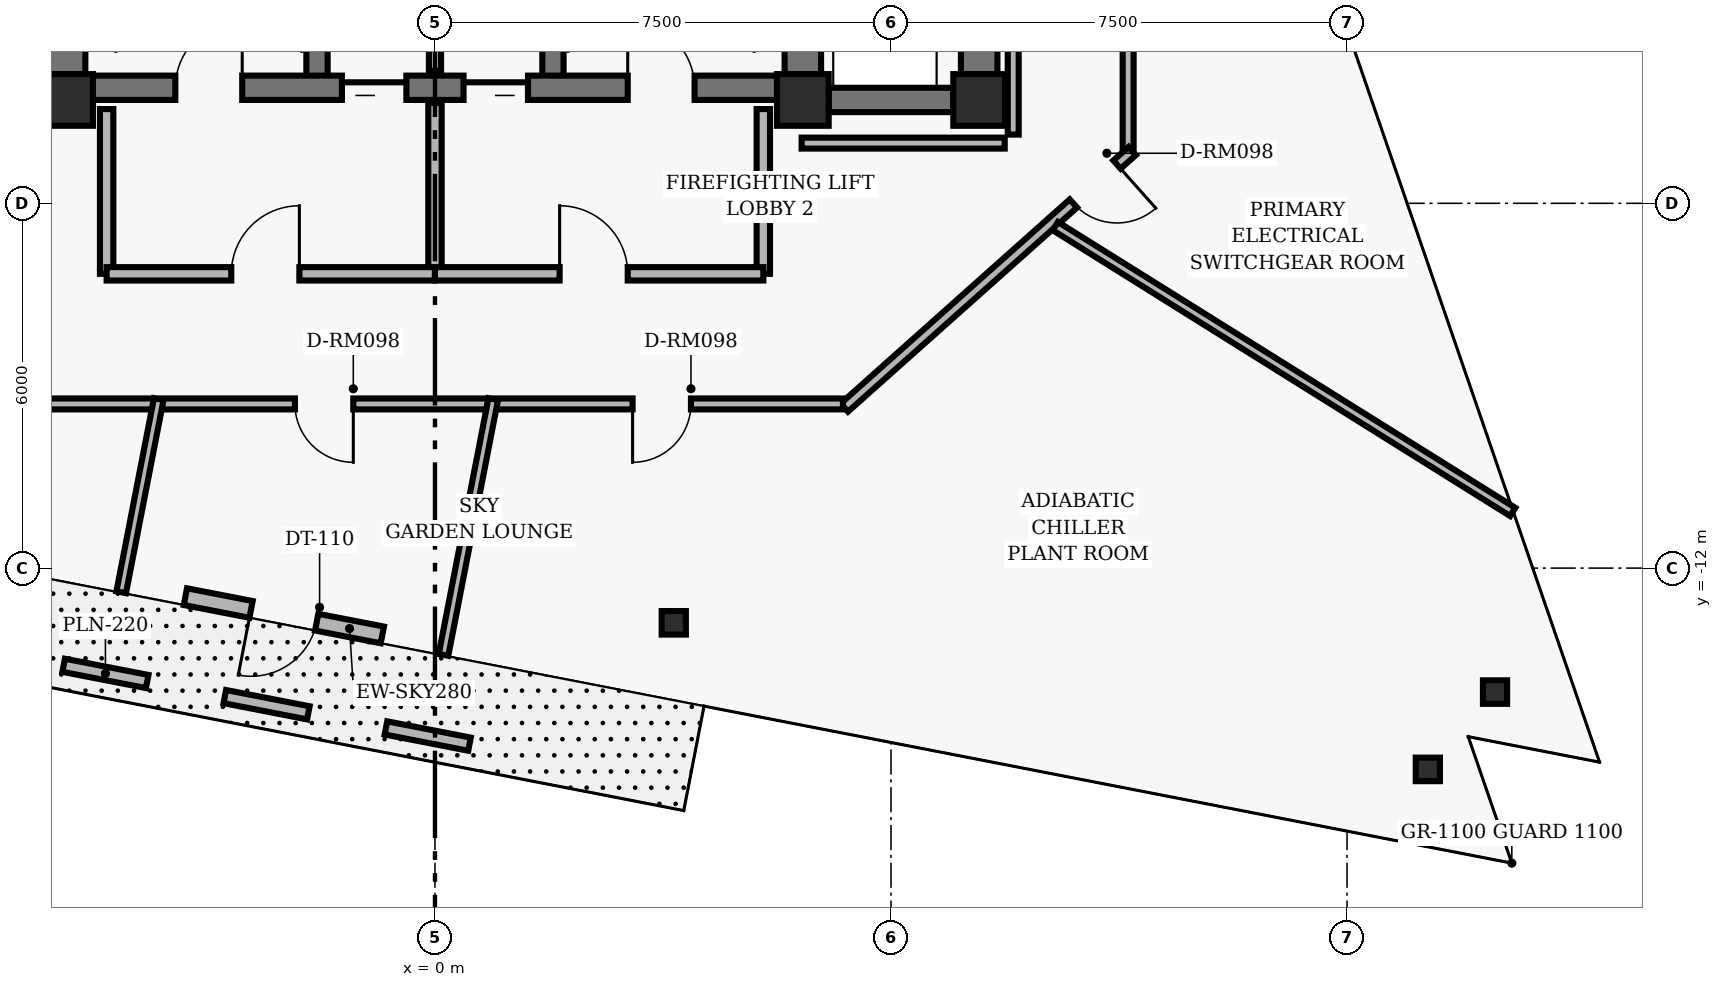
"""IFC4 building model, lengths in metres.
Left out: names, types, materials, properties, quantities, classifications, styles, units other than length and angle.
Written with IfcOpenShell. Run it as: python <this file> out.ifc"""

import sys

from ifc_helpers import new_model, si_unit, direction, frame, frame_2d, origin, origin_2d, place, context, subcontext, project, spatial, rectangle, hollow_rectangle, i_section, extrude, element, fill, save


model = new_model("IFC4")
c1 = context("Model", 3, precision=1e-05, world=origin(), true_north=direction((0.0, 1.0)))
c2 = subcontext(c1, "Body", "Model", "MODEL_VIEW")
j1 = project(units=[si_unit("LENGTHUNIT", "METRE"), si_unit("PLANEANGLEUNIT", "RADIAN")], contexts=[c1])
p1 = place(None, origin())
s1 = spatial("IfcSite", under=j1, at=p1, CompositionType="ELEMENT")
p2 = place(p1, origin())
s2 = spatial("IfcBuilding", under=s1, at=p2, CompositionType="ELEMENT")
p3 = place(p2, frame((0.0, 0.0, 171.52)))
s3 = spatial("IfcBuildingStorey", under=s2, at=p3, CompositionType="ELEMENT", Elevation=171.52)
for number, where, z_axis, x_axis in (
    (1, (-6.05, -4.3, 0.0), (0.0, 0.0, 1.0), (1.0, 0.0, 0.0)),
    (2, (6.05, -4.3, 0.0), (0.0, 0.0, 1.0), (1.0, 0.0, 0.0)),
    (3, (8.95, -4.3, 0.0), (0.0, 0.0, 1.0), (1.0, 0.0, 0.0)),
):
    element("IfcColumn", number, at=place(p3, frame(where, z_axis=z_axis, x_axis=x_axis)), inside=s3, PredefinedType="COLUMN", context=c2, shape_type="SweptSolid", body=[
        extrude(hollow_rectangle(XDim=0.85, YDim=0.85, WallThickness=0.055, InnerFilletRadius=0.02, OuterFilletRadius=0.04, at=origin_2d()), origin(), (0.0, 0.0, 1.0), 3.84),
    ])
for number, where, z_axis, x_axis in (
    (4, (-6.05, -3.875, 0.0), (0.0, 0.0, 1.0), (0.0, 1.0, 0.0)),
    (5, (6.05, -3.875, 0.0), (0.0, 0.0, 1.0), (0.0, 1.0, 0.0)),
):
    element("IfcWall", number, at=place(p3, frame(where, z_axis=z_axis, x_axis=x_axis)), inside=s3, PredefinedType="SHEAR", context=c2, shape_type="SweptSolid", body=[
        extrude(rectangle(XDim=3.45, YDim=0.6, at=frame_2d((1.725, 0.0))), origin(), (0.0, 0.0, 1.0), 3.418),
    ])
for number, where, z_axis, x_axis in (
    (6, (-1.94, -4.1, 0.0), (0.0, 0.0, 1.0), (0.0, 1.0, 0.0)),
    (7, (1.94, -4.1, 0.0), (0.0, 0.0, 1.0), (0.0, 1.0, 0.0)),
):
    element("IfcWall", number, at=place(p3, frame(where, z_axis=z_axis, x_axis=x_axis)), inside=s3, PredefinedType="SHEAR", context=c2, shape_type="SweptSolid", body=[
        extrude(rectangle(XDim=8.2, YDim=0.35, at=frame_2d((4.1, 0.0))), origin(), (0.0, 0.0, 1.0), 3.418),
    ])
p4 = place(p3, frame((-5.625, -4.1, 0.0), z_axis=(0.0, 0.0, 1.0), x_axis=(1.0, 0.0, 0.0)))
e8 = element("IfcWall", 8, at=p4, inside=s3, PredefinedType="SHEAR", context=c2, shape_type="SweptSolid", body=[
    extrude(rectangle(XDim=11.25, YDim=0.4, at=frame_2d((5.625, 0.0))), origin(), (0.0, 0.0, 1.0), 3.418),
])
p5 = place(p4, frame((1.355, 0.0, 0.0)))
e9 = element("IfcOpeningElement", 9, at=p5, cuts=e8, PredefinedType="OPENING", context=c2, shape_type="SweptSolid", body=[
    extrude(rectangle(XDim=1.1, YDim=2.04, at=frame_2d((0.55, 1.02))), frame((0.0, 0.21, 0.0), z_axis=(0.0, -1.0, 0.0), x_axis=(1.0, 0.0, 0.0)), (0.0, 0.0, 1.0), 0.42),
])
p6 = place(p4, frame((8.795, 0.0, 0.0)))
e10 = element("IfcOpeningElement", 10, at=p6, cuts=e8, PredefinedType="OPENING", context=c2, shape_type="SweptSolid", body=[
    extrude(rectangle(XDim=1.1, YDim=2.04, at=frame_2d((0.55, 1.02))), frame((0.0, 0.21, 0.0), z_axis=(0.0, -1.0, 0.0), x_axis=(1.0, 0.0, 0.0)), (0.0, 0.0, 1.0), 0.42),
])
p7 = place(p4, frame((4.095, 0.0, 0.0)))
e11 = element("IfcOpeningElement", 11, at=p7, cuts=e8, PredefinedType="OPENING", context=c2, shape_type="SweptSolid", body=[
    extrude(rectangle(XDim=1.06, YDim=2.04, at=frame_2d((0.53, 1.02))), frame((0.0, 0.21, 0.0), z_axis=(0.0, -1.0, 0.0), x_axis=(1.0, 0.0, 0.0)), (0.0, 0.0, 1.0), 0.42),
])
p8 = place(p4, frame((6.095, 0.0, 0.0)))
e12 = element("IfcOpeningElement", 12, at=p8, cuts=e8, PredefinedType="OPENING", context=c2, shape_type="SweptSolid", body=[
    extrude(rectangle(XDim=1.06, YDim=2.04, at=frame_2d((0.53, 1.02))), frame((0.0, 0.21, 0.0), z_axis=(0.0, -1.0, 0.0), x_axis=(1.0, 0.0, 0.0)), (0.0, 0.0, 1.0), 0.42),
])
p9 = place(p3, frame((8.95, -3.875, 0.0), z_axis=(0.0, 0.0, 1.0), x_axis=(0.0, 1.0, 0.0)))
e13 = element("IfcWall", 13, at=p9, inside=s3, PredefinedType="SHEAR", context=c2, shape_type="SweptSolid", body=[
    extrude(rectangle(XDim=7.95, YDim=0.6, at=frame_2d((3.975, 0.0))), origin(), (0.0, 0.0, 1.0), 3.418),
])
p10 = place(p3, frame((6.475, -4.3, 0.0), z_axis=(0.0, 0.0, 1.0), x_axis=(1.0, 0.0, 0.0)))
e14 = element("IfcWall", 14, at=p10, inside=s3, PredefinedType="SHEAR", context=c2, shape_type="SweptSolid", body=[
    extrude(rectangle(XDim=2.05, YDim=0.4, at=frame_2d((1.025, 0.0))), origin(), (0.0, 0.0, 1.0), 3.418),
])
for number, where, z_axis, x_axis in (
    (15, (17.434, -14.039, 0.0), (0.0, 0.0, 1.0), (1.0, 0.0, 0.0)),
    (16, (3.927, -12.9, 0.0), (0.0, 0.0, 1.0), (1.0, 0.0, 0.0)),
    (17, (16.329, -15.311, 0.0), (0.0, 0.0, 1.0), (1.0, 0.0, 0.0)),
):
    element("IfcColumn", number, at=place(p3, frame(where, z_axis=z_axis, x_axis=x_axis)), inside=s3, PredefinedType="COLUMN", context=c2, shape_type="SweptSolid", body=[
        extrude(i_section(OverallWidth=0.398, OverallDepth=0.387, WebThickness=0.021, FlangeThickness=0.033, FilletRadius=0.018, at=origin_2d()), origin(), (0.0, 0.0, 1.0), 3.84),
    ])
p11 = place(p3, frame((-6.107, -13.598, 0.0), z_axis=(0.0, 0.0, 1.0), x_axis=(0.981632630023, -0.190780973041, 0.0)))
e18 = element("IfcWall", 18, at=p11, inside=s3, PredefinedType="USERDEFINED", context=c2, shape_type="SweptSolid", body=[
    extrude(rectangle(XDim=1.4, YDim=0.22, at=frame_2d((0.7, 0.0))), origin(), (0.0, 0.0, 1.0), 0.65),
])
p12 = place(p3, frame((-3.457, -14.113, 0.0), z_axis=(0.0, 0.0, 1.0), x_axis=(0.98159995781, -0.190949005827, 0.0)))
e19 = element("IfcWall", 19, at=p12, inside=s3, PredefinedType="USERDEFINED", context=c2, shape_type="SweptSolid", body=[
    extrude(rectangle(XDim=1.4, YDim=0.22, at=frame_2d((0.7, 0.0))), origin(), (0.0, 0.0, 1.0), 0.65),
])
p13 = place(p3, frame((-0.806, -14.629, 0.0), z_axis=(0.0, 0.0, 1.0), x_axis=(0.981632630023, -0.190780973041, 0.0)))
e20 = element("IfcWall", 20, at=p13, inside=s3, PredefinedType="USERDEFINED", context=c2, shape_type="SweptSolid", body=[
    extrude(rectangle(XDim=1.4, YDim=0.22, at=frame_2d((0.7, 0.0))), origin(), (0.0, 0.0, 1.0), 0.65),
])
p14 = place(p3, frame((-0.865, -13.099, 0.0), z_axis=(0.0, 0.0, 1.0), x_axis=(-0.981627709222, 0.19080629048, 0.0)))
e21 = element("IfcWall", 21, at=p14, inside=s3, PredefinedType="SOLIDWALL", context=c2, shape_type="SweptSolid", body=[
    extrude(rectangle(XDim=3.3, YDim=0.28, at=frame_2d((1.65, 0.0))), origin(), (0.0, 0.0, 1.0), 2.348),
])
p15 = place(p14, frame((1.1, 0.0, 0.0)))
e22 = element("IfcOpeningElement", 22, at=p15, cuts=e21, PredefinedType="OPENING", context=c2, shape_type="SweptSolid", body=[
    extrude(rectangle(XDim=1.1, YDim=2.15, at=frame_2d((0.55, 1.075))), frame((0.0, 0.15, 0.0), z_axis=(0.0, -1.0, 0.0), x_axis=(1.0, 0.0, 0.0)), (0.0, 0.0, 1.0), 0.3),
])
p16 = place(p3, frame((0.0, -3.82, 0.0), z_axis=(0.0, 0.0, 1.0), x_axis=(0.0, 1.0, 0.0)))
e23 = element("IfcWall", 23, at=p16, inside=s3, PredefinedType="PARTITIONING", context=c2, shape_type="SweptSolid", body=[
    extrude(rectangle(XDim=2.67, YDim=0.2, at=frame_2d((1.335, 0.0))), origin(), (0.0, 0.0, 1.0), 3.393),
])
for number, where, z_axis, x_axis in (
    (24, (-5.4, -7.16, 0.0), (0.0, 0.0, 1.0), (0.0, 1.0, 0.0)),
    (25, (5.4, -7.16, 0.0), (0.0, 0.0, 1.0), (0.0, 1.0, 0.0)),
):
    element("IfcWall", number, at=place(p3, frame(where, z_axis=z_axis, x_axis=x_axis)), inside=s3, PredefinedType="PARTITIONING", context=c2, shape_type="SweptSolid", body=[
        extrude(rectangle(XDim=2.71, YDim=0.22, at=frame_2d((1.355, 0.0))), origin(), (0.0, 0.0, 1.0), 3.393),
    ])
p17 = place(p3, frame((0.0, -7.16, 0.0), z_axis=(0.0, 0.0, 1.0), x_axis=(0.0, 1.0, 0.0)))
e26 = element("IfcWall", 26, at=p17, inside=s3, PredefinedType="PARTITIONING", context=c2, shape_type="SweptSolid", body=[
    extrude(rectangle(XDim=2.81, YDim=0.22, at=frame_2d((1.405, 0.0))), origin(), (0.0, 0.0, 1.0), 3.393),
])
p18 = place(p3, frame((-5.4, -7.16, 0.0), z_axis=(0.0, 0.0, 1.0), x_axis=(1.0, 0.0, 0.0)))
e27 = element("IfcWall", 27, at=p18, inside=s3, PredefinedType="PARTITIONING", context=c2, shape_type="SweptSolid", body=[
    extrude(rectangle(XDim=5.4, YDim=0.22, at=frame_2d((2.7, 0.0))), origin(), (0.0, 0.0, 1.0), 3.393),
])
p19 = place(p18, frame((2.05, 0.0, 0.0)))
e28 = element("IfcOpeningElement", 28, at=p19, cuts=e27, PredefinedType="OPENING", context=c2, shape_type="SweptSolid", body=[
    extrude(rectangle(XDim=1.12, YDim=2.02, at=frame_2d((0.56, 1.01))), frame((0.0, 0.12, 0.0), z_axis=(0.0, -1.0, 0.0), x_axis=(1.0, 0.0, 0.0)), (0.0, 0.0, 1.0), 0.24),
])
p20 = place(p3, frame((0.0, -7.16, 0.0), z_axis=(0.0, 0.0, 1.0), x_axis=(1.0, 0.0, 0.0)))
e29 = element("IfcWall", 29, at=p20, inside=s3, PredefinedType="PARTITIONING", context=c2, shape_type="SweptSolid", body=[
    extrude(rectangle(XDim=5.4, YDim=0.22, at=frame_2d((2.7, 0.0))), origin(), (0.0, 0.0, 1.0), 2.907),
])
p21 = place(p20, frame((2.05, 0.0, 0.0)))
e30 = element("IfcOpeningElement", 30, at=p21, cuts=e29, PredefinedType="OPENING", context=c2, shape_type="SweptSolid", body=[
    extrude(rectangle(XDim=1.12, YDim=2.02, at=frame_2d((0.56, 1.01))), frame((0.0, 0.12, 0.0), z_axis=(0.0, -1.0, 0.0), x_axis=(1.0, 0.0, 0.0)), (0.0, 0.0, 1.0), 0.24),
])
p22 = place(p3, frame((11.4, 5.11, 0.0), z_axis=(0.0, 0.0, 1.0), x_axis=(0.0, -1.0, 0.0)))
e31 = element("IfcWall", 31, at=p22, inside=s3, PredefinedType="PARTITIONING", context=c2, shape_type="SweptSolid", body=[
    extrude(rectangle(XDim=10.22, YDim=0.18, at=frame_2d((5.11, 0.0))), origin(), (0.0, 0.0, 1.0), 2.907),
])
p23 = place(p3, frame((11.467, -5.14, 0.0), z_axis=(0.0, 0.0, 1.0), x_axis=(-0.746516597114, -0.665366793756, 0.0)))
e32 = element("IfcWall", 32, at=p23, inside=s3, PredefinedType="PARTITIONING", context=c2, shape_type="SweptSolid", body=[
    extrude(rectangle(XDim=6.342, YDim=0.18, at=frame_2d((3.171, 0.0))), origin(), (0.0, 0.0, 1.0), 3.393),
])
p24 = place(p23, frame((0.336, 0.0, 0.0)))
e33 = element("IfcOpeningElement", 33, at=p24, cuts=e32, PredefinedType="OPENING", context=c2, shape_type="SweptSolid", body=[
    extrude(rectangle(XDim=0.96, YDim=2.02, at=frame_2d((0.48, 1.01))), frame((0.0, 0.1, 0.0), z_axis=(0.0, -1.0, 0.0), x_axis=(1.0, 0.0, 0.0)), (0.0, 0.0, 1.0), 0.2),
])
p25 = place(p3, frame((6.71, -9.3, 0.0), z_axis=(0.0, 0.0, 1.0), x_axis=(-1.0, 0.0, 0.0)))
e34 = element("IfcWall", 34, at=p25, inside=s3, PredefinedType="PARTITIONING", context=c2, shape_type="SweptSolid", body=[
    extrude(rectangle(XDim=13.6, YDim=0.18, at=frame_2d((6.8, 0.0))), origin(), (0.0, 0.0, 1.0), 2.907),
])
p26 = place(p25, frame((8.053, 0.0, 0.0)))
e35 = element("IfcOpeningElement", 35, at=p26, cuts=e34, PredefinedType="OPENING", context=c2, shape_type="SweptSolid", body=[
    extrude(rectangle(XDim=0.96, YDim=2.02, at=frame_2d((0.48, 1.01))), frame((0.0, 0.1, 0.0), z_axis=(0.0, -1.0, 0.0), x_axis=(1.0, 0.0, 0.0)), (0.0, 0.0, 1.0), 0.2),
])
p27 = place(p25, frame((2.5, 0.0, 0.0)))
e36 = element("IfcOpeningElement", 36, at=p27, cuts=e34, PredefinedType="OPENING", context=c2, shape_type="SweptSolid", body=[
    extrude(rectangle(XDim=0.96, YDim=2.02, at=frame_2d((0.48, 1.01))), frame((0.0, 0.1, 0.0), z_axis=(0.0, -1.0, 0.0), x_axis=(1.0, 0.0, 0.0)), (0.0, 0.0, 1.0), 0.2),
])
p28 = place(p3, frame((6.03, -5.01, 0.0), z_axis=(0.0, 0.0, 1.0), x_axis=(1.0, 0.0, 0.0)))
e37 = element("IfcWall", 37, at=p28, inside=s3, PredefinedType="PARTITIONING", context=c2, shape_type="SweptSolid", body=[
    extrude(rectangle(XDim=3.34, YDim=0.18, at=frame_2d((1.67, 0.0))), origin(), (0.0, 0.0, 1.0), 3.393),
])
p29 = place(p3, frame((9.51, -4.87, 0.0), z_axis=(0.0, 0.0, 1.0), x_axis=(0.0, 1.0, 0.0)))
e38 = element("IfcWall", 38, at=p29, inside=s3, PredefinedType="PARTITIONING", context=c2, shape_type="SweptSolid", body=[
    extrude(rectangle(XDim=9.74, YDim=0.18, at=frame_2d((4.87, 0.0))), origin(), (0.0, 0.0, 1.0), 2.907),
])
p30 = place(p3, frame((10.202, -6.375, 0.0), z_axis=(0.0, 0.0, 1.0), x_axis=(0.848060141207, -0.529899987635, 0.0)))
e39 = element("IfcWall", 39, at=p30, inside=s3, PredefinedType="PARTITIONING", context=c2, shape_type="SweptSolid", body=[
    extrude(rectangle(XDim=8.871, YDim=0.16, at=frame_2d((4.436, 0.0))), origin(), (0.0, 0.0, 1.0), 3.393),
])
p31 = place(p3, frame((-4.543, -9.22, 0.0), z_axis=(0.0, 0.0, 1.0), x_axis=(-0.190788889502, -0.98163109142, 0.0)))
e40 = element("IfcWall", 40, at=p31, inside=s3, PredefinedType="PARTITIONING", context=c2, shape_type="SweptSolid", body=[
    extrude(rectangle(XDim=3.236, YDim=0.16, at=frame_2d((1.618, 0.0))), origin(), (0.0, 0.0, 1.0), 3.393),
])
p32 = place(p3, frame((0.141, -13.427, 0.0), z_axis=(0.0, 0.0, 1.0), x_axis=(0.190833065779, 0.981622504329, 0.0)))
e41 = element("IfcWall", 41, at=p32, inside=s3, PredefinedType="PARTITIONING", context=c2, shape_type="SweptSolid", body=[
    extrude(rectangle(XDim=4.286, YDim=0.16, at=frame_2d((2.143, 0.0))), origin(), (0.0, 0.0, 1.0), 3.393),
])
p33 = place(p15, origin())
e42 = element("IfcDoor", 42, at=p33, inside=s3, OperationType="SINGLE_SWING_RIGHT", PredefinedType="DOOR", context=c2, shape_type="SweptSolid", body=[
    extrude(rectangle(XDim=1.1, YDim=2.15, at=frame_2d((0.55, 1.075))), frame((0.0, 0.025, 0.0), z_axis=(0.0, -1.0, 0.0), x_axis=(1.0, 0.0, 0.0)), (0.0, 0.0, 1.0), 0.05),
])
fill(e22, e42)
p34 = place(p5, origin())
e43 = element("IfcDoor", 43, at=p34, inside=s3, OperationType="SINGLE_SWING_RIGHT", PredefinedType="DOOR", context=c2, shape_type="SweptSolid", body=[
    extrude(rectangle(XDim=1.1, YDim=2.04, at=frame_2d((0.55, 1.02))), frame((0.0, 0.025, 0.0), z_axis=(0.0, -1.0, 0.0), x_axis=(1.0, 0.0, 0.0)), (0.0, 0.0, 1.0), 0.05),
])
fill(e9, e43)
p35 = place(p6, origin())
e44 = element("IfcDoor", 44, at=p35, inside=s3, OperationType="SINGLE_SWING_LEFT", PredefinedType="DOOR", context=c2, shape_type="SweptSolid", body=[
    extrude(rectangle(XDim=1.1, YDim=2.04, at=frame_2d((0.55, 1.02))), frame((0.0, 0.025, 0.0), z_axis=(0.0, -1.0, 0.0), x_axis=(1.0, 0.0, 0.0)), (0.0, 0.0, 1.0), 0.05),
])
fill(e10, e44)
p36 = place(p7, origin())
e45 = element("IfcDoor", 45, at=p36, inside=s3, OperationType="SLIDING_TO_LEFT", PredefinedType="DOOR", context=c2, shape_type="SweptSolid", body=[
    extrude(rectangle(XDim=1.06, YDim=2.04, at=frame_2d((0.53, 1.02))), frame((0.0, 0.025, 0.0), z_axis=(0.0, -1.0, 0.0), x_axis=(1.0, 0.0, 0.0)), (0.0, 0.0, 1.0), 0.05),
])
fill(e11, e45)
p37 = place(p8, origin())
e46 = element("IfcDoor", 46, at=p37, inside=s3, OperationType="SLIDING_TO_RIGHT", PredefinedType="DOOR", context=c2, shape_type="SweptSolid", body=[
    extrude(rectangle(XDim=1.06, YDim=2.04, at=frame_2d((0.53, 1.02))), frame((0.0, 0.025, 0.0), z_axis=(0.0, -1.0, 0.0), x_axis=(1.0, 0.0, 0.0)), (0.0, 0.0, 1.0), 0.05),
])
fill(e12, e46)
p38 = place(p19, origin())
e47 = element("IfcDoor", 47, at=p38, inside=s3, OperationType="SINGLE_SWING_RIGHT", PredefinedType="DOOR", context=c2, shape_type="SweptSolid", body=[
    extrude(rectangle(XDim=1.12, YDim=2.02, at=frame_2d((0.56, 1.01))), frame((0.0, 0.025, 0.0), z_axis=(0.0, -1.0, 0.0), x_axis=(1.0, 0.0, 0.0)), (0.0, 0.0, 1.0), 0.05),
])
fill(e28, e47)
p39 = place(p21, origin())
e48 = element("IfcDoor", 48, at=p39, inside=s3, OperationType="SINGLE_SWING_LEFT", PredefinedType="DOOR", context=c2, shape_type="SweptSolid", body=[
    extrude(rectangle(XDim=1.12, YDim=2.02, at=frame_2d((0.56, 1.01))), frame((0.0, 0.025, 0.0), z_axis=(0.0, -1.0, 0.0), x_axis=(1.0, 0.0, 0.0)), (0.0, 0.0, 1.0), 0.05),
])
fill(e30, e48)
p40 = place(p26, origin())
e49 = element("IfcDoor", 49, at=p40, inside=s3, OperationType="SINGLE_SWING_LEFT", PredefinedType="DOOR", context=c2, shape_type="SweptSolid", body=[
    extrude(rectangle(XDim=0.96, YDim=2.02, at=frame_2d((0.48, 1.01))), frame((0.0, 0.025, 0.0), z_axis=(0.0, -1.0, 0.0), x_axis=(1.0, 0.0, 0.0)), (0.0, 0.0, 1.0), 0.05),
])
fill(e35, e49)
p41 = place(p27, origin())
e50 = element("IfcDoor", 50, at=p41, inside=s3, OperationType="SINGLE_SWING_RIGHT", PredefinedType="DOOR", context=c2, shape_type="SweptSolid", body=[
    extrude(rectangle(XDim=0.96, YDim=2.02, at=frame_2d((0.48, 1.01))), frame((0.0, 0.025, 0.0), z_axis=(0.0, -1.0, 0.0), x_axis=(1.0, 0.0, 0.0)), (0.0, 0.0, 1.0), 0.05),
])
fill(e36, e50)
p42 = place(p24, origin())
e51 = element("IfcDoor", 51, at=p42, inside=s3, OperationType="SINGLE_SWING_LEFT", PredefinedType="DOOR", context=c2, shape_type="SweptSolid", body=[
    extrude(rectangle(XDim=0.96, YDim=2.02, at=frame_2d((0.48, 1.01))), frame((0.0, 0.025, 0.0), z_axis=(0.0, -1.0, 0.0), x_axis=(1.0, 0.0, 0.0)), (0.0, 0.0, 1.0), 0.05),
])
fill(e33, e51)
save(model, sys.argv[1])
